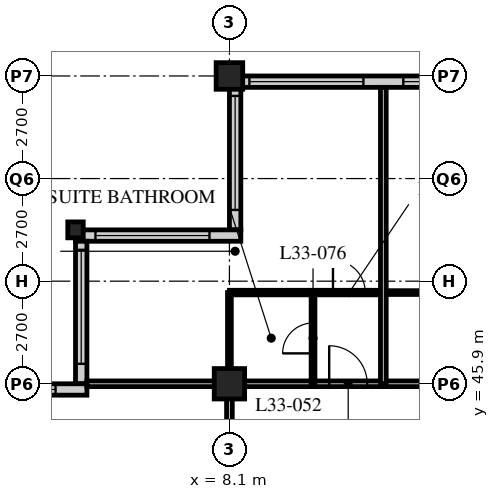
"""IFC4 building model, lengths in metres.
Left out: names, types, materials, properties, quantities, classifications, styles, units other than length and angle.
Written with IfcOpenShell. Run it as: python <this file> out.ifc"""

import sys

from ifc_helpers import new_model, si_unit, direction, frame, frame_2d, origin, origin_2d, place, context, subcontext, project, spatial, rectangle, hollow_rectangle, i_section, extrude, element, fill, save


model = new_model("IFC4")
c1 = context("Model", 3, precision=1e-05, world=origin(), true_north=direction((0.0, 1.0)))
c2 = subcontext(c1, "Body", "Model", "MODEL_VIEW")
j1 = project(units=[si_unit("LENGTHUNIT", "METRE"), si_unit("PLANEANGLEUNIT", "RADIAN")], contexts=[c1])
p1 = place(None, origin())
s1 = spatial("IfcSite", under=j1, at=p1, CompositionType="ELEMENT")
p2 = place(p1, origin())
s2 = spatial("IfcBuilding", under=s1, at=p2, CompositionType="ELEMENT")
p3 = place(p2, frame((0.0, 0.0, 130.6)))
s3 = spatial("IfcBuildingStorey", under=s2, at=p3, CompositionType="ELEMENT", Elevation=130.6)
p4 = place(p3, frame((4.05, 49.95, 0.0), z_axis=(0.0, 0.0, 1.0), x_axis=(1.0, 0.0, 0.0)))
e1 = element("IfcColumn", 1, at=p4, inside=s3, PredefinedType="COLUMN", context=c2, shape_type="SweptSolid", body=[
    extrude(i_section(OverallWidth=0.407, OverallDepth=0.419, WebThickness=0.031, FlangeThickness=0.049, FilletRadius=0.015, at=origin_2d()), origin(), (0.0, 0.0, 1.0), 3.4),
])
p5 = place(p3, frame((8.1, 45.9, 0.0), z_axis=(0.0, 0.0, 1.0), x_axis=(1.0, 0.0, 0.0)))
e2 = element("IfcColumn", 2, at=p5, inside=s3, PredefinedType="COLUMN", context=c2, shape_type="SweptSolid", body=[
    extrude(hollow_rectangle(XDim=0.8, YDim=0.8, WallThickness=0.08, at=origin_2d()), origin(), (0.0, 0.0, 1.0), 3.4),
])
p6 = place(p3, frame((8.1, 54.0, 0.0), z_axis=(0.0, 0.0, 1.0), x_axis=(1.0, 0.0, 0.0)))
e3 = element("IfcColumn", 3, at=p6, inside=s3, PredefinedType="COLUMN", context=c2, shape_type="SweptSolid", body=[
    extrude(hollow_rectangle(XDim=0.7, YDim=0.7, WallThickness=0.07, at=origin_2d()), origin(), (0.0, 0.0, 1.0), 3.4),
])
p7 = place(p3, frame((48.3, 53.85, 0.0), z_axis=(0.0, 0.0, 1.0), x_axis=(-1.0, 0.0, 0.0)))
e4 = element("IfcWall", 4, at=p7, inside=s3, PredefinedType="SOLIDWALL", context=c2, shape_type="SweptSolid", body=[
    extrude(rectangle(XDim=40.2, YDim=0.3, at=frame_2d((20.1, 0.0))), origin(), (0.0, 0.0, 1.0), 3.19),
])
p8 = place(p7, frame((0.225, 0.0, 0.9)))
e5 = element("IfcOpeningElement", 5, at=p8, cuts=e4, PredefinedType="OPENING", context=c2, shape_type="SweptSolid", body=[
    extrude(rectangle(XDim=3.0, YDim=2.0, at=frame_2d((1.5, 1.0))), frame((0.0, 0.16, 0.0), z_axis=(0.0, -1.0, 0.0), x_axis=(1.0, 0.0, 0.0)), (0.0, 0.0, 1.0), 0.32),
])
p9 = place(p7, frame((4.275, 0.0, 0.9)))
e6 = element("IfcOpeningElement", 6, at=p9, cuts=e4, PredefinedType="OPENING", context=c2, shape_type="SweptSolid", body=[
    extrude(rectangle(XDim=3.0, YDim=2.0, at=frame_2d((1.5, 1.0))), frame((0.0, 0.16, 0.0), z_axis=(0.0, -1.0, 0.0), x_axis=(1.0, 0.0, 0.0)), (0.0, 0.0, 1.0), 0.32),
])
p10 = place(p7, frame((8.325, 0.0, 0.9)))
e7 = element("IfcOpeningElement", 7, at=p10, cuts=e4, PredefinedType="OPENING", context=c2, shape_type="SweptSolid", body=[
    extrude(rectangle(XDim=3.0, YDim=2.0, at=frame_2d((1.5, 1.0))), frame((0.0, 0.16, 0.0), z_axis=(0.0, -1.0, 0.0), x_axis=(1.0, 0.0, 0.0)), (0.0, 0.0, 1.0), 0.32),
])
p11 = place(p7, frame((12.375, 0.0, 0.9)))
e8 = element("IfcOpeningElement", 8, at=p11, cuts=e4, PredefinedType="OPENING", context=c2, shape_type="SweptSolid", body=[
    extrude(rectangle(XDim=3.0, YDim=2.0, at=frame_2d((1.5, 1.0))), frame((0.0, 0.16, 0.0), z_axis=(0.0, -1.0, 0.0), x_axis=(1.0, 0.0, 0.0)), (0.0, 0.0, 1.0), 0.32),
])
p12 = place(p7, frame((16.425, 0.0, 0.9)))
e9 = element("IfcOpeningElement", 9, at=p12, cuts=e4, PredefinedType="OPENING", context=c2, shape_type="SweptSolid", body=[
    extrude(rectangle(XDim=3.0, YDim=2.0, at=frame_2d((1.5, 1.0))), frame((0.0, 0.16, 0.0), z_axis=(0.0, -1.0, 0.0), x_axis=(1.0, 0.0, 0.0)), (0.0, 0.0, 1.0), 0.32),
])
p13 = place(p7, frame((20.475, 0.0, 0.9)))
e10 = element("IfcOpeningElement", 10, at=p13, cuts=e4, PredefinedType="OPENING", context=c2, shape_type="SweptSolid", body=[
    extrude(rectangle(XDim=3.0, YDim=2.0, at=frame_2d((1.5, 1.0))), frame((0.0, 0.16, 0.0), z_axis=(0.0, -1.0, 0.0), x_axis=(1.0, 0.0, 0.0)), (0.0, 0.0, 1.0), 0.32),
])
p14 = place(p7, frame((24.525, 0.0, 0.9)))
e11 = element("IfcOpeningElement", 11, at=p14, cuts=e4, PredefinedType="OPENING", context=c2, shape_type="SweptSolid", body=[
    extrude(rectangle(XDim=3.0, YDim=2.0, at=frame_2d((1.5, 1.0))), frame((0.0, 0.16, 0.0), z_axis=(0.0, -1.0, 0.0), x_axis=(1.0, 0.0, 0.0)), (0.0, 0.0, 1.0), 0.32),
])
p15 = place(p7, frame((28.575, 0.0, 0.9)))
e12 = element("IfcOpeningElement", 12, at=p15, cuts=e4, PredefinedType="OPENING", context=c2, shape_type="SweptSolid", body=[
    extrude(rectangle(XDim=3.0, YDim=2.0, at=frame_2d((1.5, 1.0))), frame((0.0, 0.16, 0.0), z_axis=(0.0, -1.0, 0.0), x_axis=(1.0, 0.0, 0.0)), (0.0, 0.0, 1.0), 0.32),
])
p16 = place(p7, frame((32.625, 0.0, 0.9)))
e13 = element("IfcOpeningElement", 13, at=p16, cuts=e4, PredefinedType="OPENING", context=c2, shape_type="SweptSolid", body=[
    extrude(rectangle(XDim=3.0, YDim=2.0, at=frame_2d((1.5, 1.0))), frame((0.0, 0.16, 0.0), z_axis=(0.0, -1.0, 0.0), x_axis=(1.0, 0.0, 0.0)), (0.0, 0.0, 1.0), 0.32),
])
p17 = place(p7, frame((36.675, 0.0, 0.9)))
e14 = element("IfcOpeningElement", 14, at=p17, cuts=e4, PredefinedType="OPENING", context=c2, shape_type="SweptSolid", body=[
    extrude(rectangle(XDim=3.0, YDim=2.0, at=frame_2d((1.5, 1.0))), frame((0.0, 0.16, 0.0), z_axis=(0.0, -1.0, 0.0), x_axis=(1.0, 0.0, 0.0)), (0.0, 0.0, 1.0), 0.32),
])
p18 = place(p3, frame((8.25, 53.7, 0.0), z_axis=(0.0, 0.0, 1.0), x_axis=(0.0, -1.0, 0.0)))
e15 = element("IfcWall", 15, at=p18, inside=s3, PredefinedType="SOLIDWALL", context=c2, shape_type="SweptSolid", body=[
    extrude(rectangle(XDim=3.75, YDim=0.3, at=frame_2d((1.875, 0.0))), origin(), (0.0, 0.0, 1.0), 3.19),
])
p19 = place(p18, frame((0.225, 0.0, 0.9)))
e16 = element("IfcOpeningElement", 16, at=p19, cuts=e15, PredefinedType="OPENING", context=c2, shape_type="SweptSolid", body=[
    extrude(rectangle(XDim=3.0, YDim=1.5, at=frame_2d((1.5, 0.75))), frame((0.0, 0.16, 0.0), z_axis=(0.0, -1.0, 0.0), x_axis=(1.0, 0.0, 0.0)), (0.0, 0.0, 1.0), 0.32),
])
p20 = place(p3, frame((8.4, 49.8, 0.0), z_axis=(0.0, 0.0, 1.0), x_axis=(-1.0, 0.0, 0.0)))
e17 = element("IfcWall", 17, at=p20, inside=s3, PredefinedType="SOLIDWALL", context=c2, shape_type="SweptSolid", body=[
    extrude(rectangle(XDim=4.35, YDim=0.3, at=frame_2d((2.175, 0.0))), origin(), (0.0, 0.0, 1.0), 3.19),
])
p21 = place(p20, frame((0.825, 0.0, 0.9)))
e18 = element("IfcOpeningElement", 18, at=p21, cuts=e17, PredefinedType="OPENING", context=c2, shape_type="SweptSolid", body=[
    extrude(rectangle(XDim=3.0, YDim=1.5, at=frame_2d((1.5, 0.75))), frame((0.0, 0.16, 0.0), z_axis=(0.0, -1.0, 0.0), x_axis=(1.0, 0.0, 0.0)), (0.0, 0.0, 1.0), 0.32),
])
p22 = place(p3, frame((4.2, 49.65, 0.0), z_axis=(0.0, 0.0, 1.0), x_axis=(0.0, -1.0, 0.0)))
e19 = element("IfcWall", 19, at=p22, inside=s3, PredefinedType="SOLIDWALL", context=c2, shape_type="SweptSolid", body=[
    extrude(rectangle(XDim=3.75, YDim=0.3, at=frame_2d((1.875, 0.0))), origin(), (0.0, 0.0, 1.0), 3.19),
])
p23 = place(p22, frame((0.225, 0.0, 0.9)))
e20 = element("IfcOpeningElement", 20, at=p23, cuts=e19, PredefinedType="OPENING", context=c2, shape_type="SweptSolid", body=[
    extrude(rectangle(XDim=3.0, YDim=1.5, at=frame_2d((1.5, 0.75))), frame((0.0, 0.16, 0.0), z_axis=(0.0, -1.0, 0.0), x_axis=(1.0, 0.0, 0.0)), (0.0, 0.0, 1.0), 0.32),
])
p24 = place(p3, frame((4.35, 45.75, 0.0), z_axis=(0.0, 0.0, 1.0), x_axis=(-1.0, 0.0, 0.0)))
e21 = element("IfcWall", 21, at=p24, inside=s3, PredefinedType="SOLIDWALL", context=c2, shape_type="SweptSolid", body=[
    extrude(rectangle(XDim=4.35, YDim=0.3, at=frame_2d((2.175, 0.0))), origin(), (0.0, 0.0, 1.0), 3.19),
])
p25 = place(p24, frame((0.825, 0.0, 0.9)))
e22 = element("IfcOpeningElement", 22, at=p25, cuts=e21, PredefinedType="OPENING", context=c2, shape_type="SweptSolid", body=[
    extrude(rectangle(XDim=3.0, YDim=1.5, at=frame_2d((1.5, 0.75))), frame((0.0, 0.16, 0.0), z_axis=(0.0, -1.0, 0.0), x_axis=(1.0, 0.0, 0.0)), (0.0, 0.0, 1.0), 0.32),
])
p26 = place(p3, frame((8.1, 45.9, 0.0), z_axis=(0.0, 0.0, 1.0), x_axis=(1.0, 0.0, 0.0)))
e23 = element("IfcWall", 23, at=p26, inside=s3, PredefinedType="PARTITIONING", context=c2, shape_type="SweptSolid", body=[
    extrude(rectangle(XDim=40.5, YDim=0.15, at=frame_2d((20.25, 0.0))), origin(), (0.0, 0.0, 1.0), 2.578),
])
p27 = place(p26, frame((9.625, 0.0, 0.0)))
e24 = element("IfcOpeningElement", 24, at=p27, cuts=e23, PredefinedType="OPENING", context=c2, shape_type="SweptSolid", body=[
    extrude(rectangle(XDim=1.0, YDim=2.1, at=frame_2d((0.5, 1.05))), frame((0.0, 0.085, 0.0), z_axis=(0.0, -1.0, 0.0), x_axis=(1.0, 0.0, 0.0)), (0.0, 0.0, 1.0), 0.17),
])
p28 = place(p26, frame((21.65, 0.0, 0.0)))
e25 = element("IfcOpeningElement", 25, at=p28, cuts=e23, PredefinedType="OPENING", context=c2, shape_type="SweptSolid", body=[
    extrude(rectangle(XDim=1.0, YDim=2.1, at=frame_2d((0.5, 1.05))), frame((0.0, 0.085, 0.0), z_axis=(0.0, -1.0, 0.0), x_axis=(1.0, 0.0, 0.0)), (0.0, 0.0, 1.0), 0.17),
])
p29 = place(p26, frame((26.75, 0.0, 0.0)))
e26 = element("IfcOpeningElement", 26, at=p29, cuts=e23, PredefinedType="OPENING", context=c2, shape_type="SweptSolid", body=[
    extrude(rectangle(XDim=1.0, YDim=2.1, at=frame_2d((0.5, 1.05))), frame((0.0, 0.085, 0.0), z_axis=(0.0, -1.0, 0.0), x_axis=(1.0, 0.0, 0.0)), (0.0, 0.0, 1.0), 0.17),
])
p30 = place(p26, frame((28.95, 0.0, 0.0)))
e27 = element("IfcOpeningElement", 27, at=p30, cuts=e23, PredefinedType="OPENING", context=c2, shape_type="SweptSolid", body=[
    extrude(rectangle(XDim=1.0, YDim=2.1, at=frame_2d((0.5, 1.05))), frame((0.0, 0.085, 0.0), z_axis=(0.0, -1.0, 0.0), x_axis=(1.0, 0.0, 0.0)), (0.0, 0.0, 1.0), 0.17),
])
p31 = place(p26, frame((34.85, 0.0, 0.0)))
e28 = element("IfcOpeningElement", 28, at=p31, cuts=e23, PredefinedType="OPENING", context=c2, shape_type="SweptSolid", body=[
    extrude(rectangle(XDim=1.0, YDim=2.1, at=frame_2d((0.5, 1.05))), frame((0.0, 0.085, 0.0), z_axis=(0.0, -1.0, 0.0), x_axis=(1.0, 0.0, 0.0)), (0.0, 0.0, 1.0), 0.17),
])
p32 = place(p26, frame((36.875, 0.0, 0.0)))
e29 = element("IfcOpeningElement", 29, at=p32, cuts=e23, PredefinedType="OPENING", context=c2, shape_type="SweptSolid", body=[
    extrude(rectangle(XDim=1.0, YDim=2.1, at=frame_2d((0.5, 1.05))), frame((0.0, 0.085, 0.0), z_axis=(0.0, -1.0, 0.0), x_axis=(1.0, 0.0, 0.0)), (0.0, 0.0, 1.0), 0.17),
])
p33 = place(p26, frame((2.625, 0.0, 0.0)))
e30 = element("IfcOpeningElement", 30, at=p33, cuts=e23, PredefinedType="OPENING", context=c2, shape_type="SweptSolid", body=[
    extrude(rectangle(XDim=1.0, YDim=2.1, at=frame_2d((0.5, 1.05))), frame((0.0, 0.085, 0.0), z_axis=(0.0, -1.0, 0.0), x_axis=(1.0, 0.0, 0.0)), (0.0, 0.0, 1.0), 0.17),
])
p34 = place(p3, frame((8.1, 21.6, 0.0), z_axis=(0.0, 0.0, 1.0), x_axis=(0.0, 1.0, 0.0)))
e31 = element("IfcWall", 31, at=p34, inside=s3, PredefinedType="PARTITIONING", context=c2, shape_type="SweptSolid", body=[
    extrude(rectangle(XDim=24.3, YDim=0.15, at=frame_2d((12.15, 0.0))), origin(), (0.0, 0.0, 1.0), 2.578),
])
p35 = place(p34, frame((5.45, 0.0, 0.0)))
e32 = element("IfcOpeningElement", 32, at=p35, cuts=e31, PredefinedType="OPENING", context=c2, shape_type="SweptSolid", body=[
    extrude(rectangle(XDim=1.0, YDim=2.1, at=frame_2d((0.5, 1.05))), frame((0.0, 0.085, 0.0), z_axis=(0.0, -1.0, 0.0), x_axis=(1.0, 0.0, 0.0)), (0.0, 0.0, 1.0), 0.17),
])
p36 = place(p34, frame((10.0, 0.0, 0.0)))
e33 = element("IfcOpeningElement", 33, at=p36, cuts=e31, PredefinedType="OPENING", context=c2, shape_type="SweptSolid", body=[
    extrude(rectangle(XDim=1.0, YDim=2.1, at=frame_2d((0.5, 1.05))), frame((0.0, 0.085, 0.0), z_axis=(0.0, -1.0, 0.0), x_axis=(1.0, 0.0, 0.0)), (0.0, 0.0, 1.0), 0.17),
])
p37 = place(p34, frame((21.65, 0.0, 0.0)))
e34 = element("IfcOpeningElement", 34, at=p37, cuts=e31, PredefinedType="OPENING", context=c2, shape_type="SweptSolid", body=[
    extrude(rectangle(XDim=1.0, YDim=2.1, at=frame_2d((0.5, 1.05))), frame((0.0, 0.085, 0.0), z_axis=(0.0, -1.0, 0.0), x_axis=(1.0, 0.0, 0.0)), (0.0, 0.0, 1.0), 0.17),
])
p38 = place(p3, frame((12.15, 48.3, 0.0), z_axis=(0.0, 0.0, 1.0), x_axis=(1.0, 0.0, 0.0)))
e35 = element("IfcWall", 35, at=p38, inside=s3, PredefinedType="PARTITIONING", context=c2, shape_type="SweptSolid", body=[
    extrude(rectangle(XDim=2.6, YDim=0.1, at=frame_2d((1.3, 0.0))), origin(), (0.0, 0.0, 1.0), 3.19),
])
p39 = place(p3, frame((8.1, 48.3, 0.0), z_axis=(0.0, 0.0, 1.0), x_axis=(1.0, 0.0, 0.0)))
e36 = element("IfcWall", 36, at=p39, inside=s3, PredefinedType="PARTITIONING", context=c2, shape_type="SweptSolid", body=[
    extrude(rectangle(XDim=4.05, YDim=0.12, at=frame_2d((2.025, 0.0))), origin(), (0.0, 0.0, 1.0), 3.19),
])
p40 = place(p39, frame((2.725, 0.0, 0.0)))
e37 = element("IfcOpeningElement", 37, at=p40, cuts=e36, PredefinedType="OPENING", context=c2, shape_type="SweptSolid", body=[
    extrude(rectangle(XDim=0.85, YDim=2.1, at=frame_2d((0.425, 1.05))), frame((0.0, 0.07, 0.0), z_axis=(0.0, -1.0, 0.0), x_axis=(1.0, 0.0, 0.0)), (0.0, 0.0, 1.0), 0.14),
])
p41 = place(p3, frame((10.3, 45.9, 0.0), z_axis=(0.0, 0.0, 1.0), x_axis=(0.0, 1.0, 0.0)))
e38 = element("IfcWall", 38, at=p41, inside=s3, PredefinedType="PARTITIONING", context=c2, shape_type="SweptSolid", body=[
    extrude(rectangle(XDim=2.4, YDim=0.1, at=frame_2d((1.2, 0.0))), origin(), (0.0, 0.0, 1.0), 3.19),
])
p42 = place(p41, frame((0.8, 0.0, 0.0)))
e39 = element("IfcOpeningElement", 39, at=p42, cuts=e38, PredefinedType="OPENING", context=c2, shape_type="SweptSolid", body=[
    extrude(rectangle(XDim=0.8, YDim=2.1, at=frame_2d((0.4, 1.05))), frame((0.0, 0.06, 0.0), z_axis=(0.0, -1.0, 0.0), x_axis=(1.0, 0.0, 0.0)), (0.0, 0.0, 1.0), 0.12),
])
p43 = place(p3, frame((8.1, 45.9, 0.0), z_axis=(0.0, 0.0, 1.0), x_axis=(0.0, 1.0, 0.0)))
e40 = element("IfcWall", 40, at=p43, inside=s3, PredefinedType="PARTITIONING", context=c2, shape_type="SweptSolid", body=[
    extrude(rectangle(XDim=2.4, YDim=0.1, at=frame_2d((1.2, 0.0))), origin(), (0.0, 0.0, 1.0), 2.578),
])
p44 = place(p3, frame((4.35, 45.9, 0.0), z_axis=(0.0, 0.0, 1.0), x_axis=(1.0, 0.0, 0.0)))
e41 = element("IfcWall", 41, at=p44, inside=s3, PredefinedType="PARTITIONING", context=c2, shape_type="SweptSolid", body=[
    extrude(rectangle(XDim=3.75, YDim=0.15, at=frame_2d((1.875, 0.0))), origin(), (0.0, 0.0, 1.0), 2.578),
])
p45 = place(p3, frame((12.15, 45.9, 0.0), z_axis=(0.0, 0.0, 1.0), x_axis=(0.0, 1.0, 0.0)))
e42 = element("IfcWall", 42, at=p45, inside=s3, PredefinedType="PARTITIONING", context=c2, shape_type="SweptSolid", body=[
    extrude(rectangle(XDim=7.8, YDim=0.15, at=frame_2d((3.9, 0.0))), origin(), (0.0, 0.0, 1.0), 3.19),
])
p46 = place(p16, origin())
e43 = element("IfcWindow", 43, at=p46, inside=s3, PartitioningType="SINGLE_PANEL", PredefinedType="WINDOW", context=c2, shape_type="SweptSolid", body=[
    extrude(rectangle(XDim=3.0, YDim=2.0, at=frame_2d((1.5, 1.0))), frame((0.0, 0.03, 0.0), z_axis=(0.0, -1.0, 0.0), x_axis=(1.0, 0.0, 0.0)), (0.0, 0.0, 1.0), 0.06),
])
fill(e13, e43)
p47 = place(p17, origin())
e44 = element("IfcWindow", 44, at=p47, inside=s3, PartitioningType="SINGLE_PANEL", PredefinedType="WINDOW", context=c2, shape_type="SweptSolid", body=[
    extrude(rectangle(XDim=3.0, YDim=2.0, at=frame_2d((1.5, 1.0))), frame((0.0, 0.03, 0.0), z_axis=(0.0, -1.0, 0.0), x_axis=(1.0, 0.0, 0.0)), (0.0, 0.0, 1.0), 0.06),
])
fill(e14, e44)
p48 = place(p19, origin())
e45 = element("IfcWindow", 45, at=p48, inside=s3, PartitioningType="SINGLE_PANEL", PredefinedType="WINDOW", context=c2, shape_type="SweptSolid", body=[
    extrude(rectangle(XDim=3.0, YDim=1.5, at=frame_2d((1.5, 0.75))), frame((0.0, 0.03, 0.0), z_axis=(0.0, -1.0, 0.0), x_axis=(1.0, 0.0, 0.0)), (0.0, 0.0, 1.0), 0.06),
])
fill(e16, e45)
p49 = place(p21, origin())
e46 = element("IfcWindow", 46, at=p49, inside=s3, PartitioningType="SINGLE_PANEL", PredefinedType="WINDOW", context=c2, shape_type="SweptSolid", body=[
    extrude(rectangle(XDim=3.0, YDim=1.5, at=frame_2d((1.5, 0.75))), frame((0.0, 0.03, 0.0), z_axis=(0.0, -1.0, 0.0), x_axis=(1.0, 0.0, 0.0)), (0.0, 0.0, 1.0), 0.06),
])
fill(e18, e46)
p50 = place(p23, origin())
e47 = element("IfcWindow", 47, at=p50, inside=s3, PartitioningType="SINGLE_PANEL", PredefinedType="WINDOW", context=c2, shape_type="SweptSolid", body=[
    extrude(rectangle(XDim=3.0, YDim=1.5, at=frame_2d((1.5, 0.75))), frame((0.0, 0.03, 0.0), z_axis=(0.0, -1.0, 0.0), x_axis=(1.0, 0.0, 0.0)), (0.0, 0.0, 1.0), 0.06),
])
fill(e20, e47)
p51 = place(p25, origin())
e48 = element("IfcWindow", 48, at=p51, inside=s3, PartitioningType="SINGLE_PANEL", PredefinedType="WINDOW", context=c2, shape_type="SweptSolid", body=[
    extrude(rectangle(XDim=3.0, YDim=1.5, at=frame_2d((1.5, 0.75))), frame((0.0, 0.03, 0.0), z_axis=(0.0, -1.0, 0.0), x_axis=(1.0, 0.0, 0.0)), (0.0, 0.0, 1.0), 0.06),
])
fill(e22, e48)
p52 = place(p42, origin())
e49 = element("IfcDoor", 49, at=p52, inside=s3, OperationType="SINGLE_SWING_LEFT", PredefinedType="DOOR", context=c2, shape_type="SweptSolid", body=[
    extrude(rectangle(XDim=0.8, YDim=2.1, at=frame_2d((0.4, 1.05))), frame((0.0, 0.025, 0.0), z_axis=(0.0, -1.0, 0.0), x_axis=(1.0, 0.0, 0.0)), (0.0, 0.0, 1.0), 0.05),
])
fill(e39, e49)
p53 = place(p33, origin())
e50 = element("IfcDoor", 50, at=p53, inside=s3, OperationType="SINGLE_SWING_LEFT", PredefinedType="DOOR", context=c2, shape_type="SweptSolid", body=[
    extrude(rectangle(XDim=1.0, YDim=2.1, at=frame_2d((0.5, 1.05))), frame((0.0, 0.025, 0.0), z_axis=(0.0, -1.0, 0.0), x_axis=(1.0, 0.0, 0.0)), (0.0, 0.0, 1.0), 0.05),
])
fill(e30, e50)
p54 = place(p40, origin())
e51 = element("IfcDoor", 51, at=p54, inside=s3, OperationType="SINGLE_SWING_LEFT", PredefinedType="DOOR", context=c2, shape_type="SweptSolid", body=[
    extrude(rectangle(XDim=0.85, YDim=2.1, at=frame_2d((0.425, 1.05))), frame((0.0, 0.025, 0.0), z_axis=(0.0, -1.0, 0.0), x_axis=(1.0, 0.0, 0.0)), (0.0, 0.0, 1.0), 0.05),
])
fill(e37, e51)
save(model, sys.argv[1])
